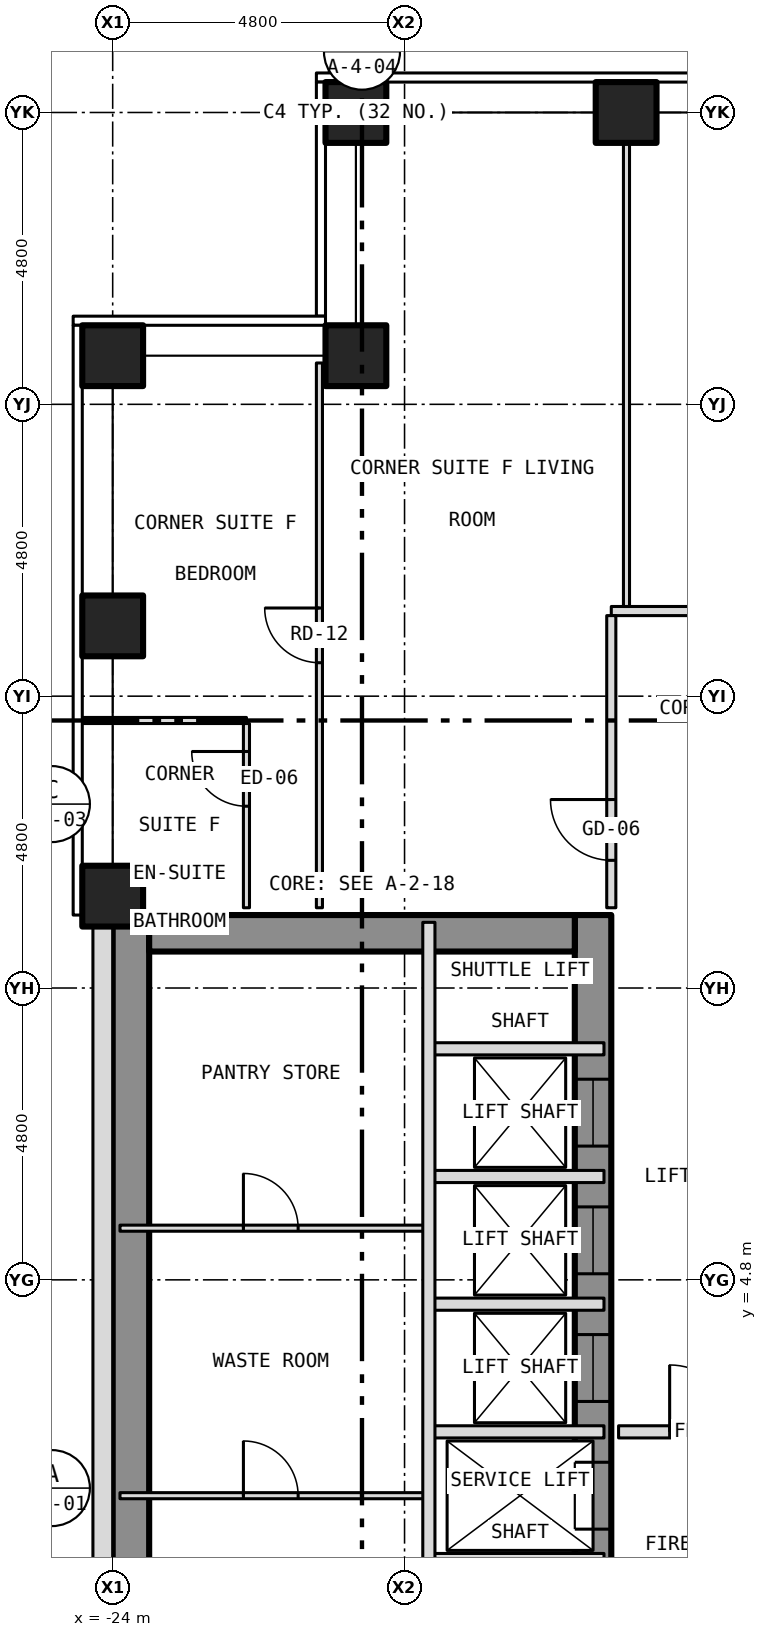
"""IFC4 building model, lengths in metres.
Left out: names, types, materials, properties, quantities, classifications, styles, units other than length and angle.
Written with IfcOpenShell. Run it as: python <this file> out.ifc"""

import sys

from ifc_helpers import new_model, si_unit, direction, frame, frame_2d, origin, origin_2d, place, context, subcontext, project, spatial, rectangle, hollow_rectangle, extrude, element, fill, save


model = new_model("IFC4")
c1 = context("Model", 3, precision=1e-05, world=origin(), true_north=direction((0.0, 1.0)))
c2 = subcontext(c1, "Body", "Model", "MODEL_VIEW")
j1 = project(units=[si_unit("LENGTHUNIT", "METRE"), si_unit("PLANEANGLEUNIT", "RADIAN")], contexts=[c1])
p1 = place(None, origin())
s1 = spatial("IfcSite", under=j1, at=p1, CompositionType="ELEMENT")
p2 = place(p1, origin())
s2 = spatial("IfcBuilding", under=s1, at=p2, CompositionType="ELEMENT")
p3 = place(p2, frame((0.0, 0.0, 67.0)))
s3 = spatial("IfcBuildingStorey", under=s2, at=p3, CompositionType="ELEMENT", Elevation=67.0)
for number, where, z_axis, x_axis in (
    (1, (-20.0, 24.0, -0.15), (0.0, 0.0, 1.0), (1.0, 0.0, 0.0)),
    (2, (-15.556, 24.0, -0.15), (0.0, 0.0, 1.0), (1.0, 0.0, 0.0)),
    (3, (-24.0, 11.111, -0.15), (0.0, 0.0, 1.0), (1.0, 0.0, 0.0)),
    (4, (-24.0, 15.556, -0.15), (0.0, 0.0, 1.0), (1.0, 0.0, 0.0)),
    (5, (-24.0, 20.0, -0.15), (0.0, 0.0, 1.0), (1.0, 0.0, 0.0)),
    (6, (-20.0, 20.0, -0.15), (0.0, 0.0, 1.0), (1.0, 0.0, 0.0)),
):
    element("IfcColumn", number, at=place(p3, frame(where, z_axis=z_axis, x_axis=x_axis)), inside=s3, PredefinedType="COLUMN", context=c2, shape_type="SweptSolid", body=[
        extrude(hollow_rectangle(XDim=1.0, YDim=1.0, WallThickness=0.06, at=origin_2d()), origin(), (0.0, 0.0, 1.0), 3.5),
    ])
p4 = place(p3, frame((-16.1, -10.8, 0.0), z_axis=(0.0, 0.0, 1.0), x_axis=(0.0, 1.0, 0.0)))
e7 = element("IfcWall", 7, at=p4, inside=s3, PredefinedType="SHEAR", context=c2, shape_type="SweptSolid", body=[
    extrude(rectangle(XDim=21.6, YDim=0.6, at=frame_2d((10.8, 0.0))), origin(), (0.0, 0.0, 1.0), 3.25),
])
p5 = place(p4, frame((9.4, 0.0, 0.0)))
e8 = element("IfcOpeningElement", 8, at=p5, cuts=e7, PredefinedType="OPENING", context=c2, shape_type="SweptSolid", body=[
    extrude(rectangle(XDim=1.1, YDim=2.1, at=frame_2d((0.55, 1.05))), frame((0.0, 0.312, 0.0), z_axis=(0.0, -1.0, 0.0), x_axis=(1.0, 0.0, 0.0)), (0.0, 0.0, 1.0), 0.624),
])
p6 = place(p4, frame((11.5, 0.0, 0.0)))
e9 = element("IfcOpeningElement", 9, at=p6, cuts=e7, PredefinedType="OPENING", context=c2, shape_type="SweptSolid", body=[
    extrude(rectangle(XDim=1.1, YDim=2.1, at=frame_2d((0.55, 1.05))), frame((0.0, 0.312, 0.0), z_axis=(0.0, -1.0, 0.0), x_axis=(1.0, 0.0, 0.0)), (0.0, 0.0, 1.0), 0.624),
])
p7 = place(p4, frame((13.6, 0.0, 0.0)))
e10 = element("IfcOpeningElement", 10, at=p7, cuts=e7, PredefinedType="OPENING", context=c2, shape_type="SweptSolid", body=[
    extrude(rectangle(XDim=1.1, YDim=2.1, at=frame_2d((0.55, 1.05))), frame((0.0, 0.312, 0.0), z_axis=(0.0, -1.0, 0.0), x_axis=(1.0, 0.0, 0.0)), (0.0, 0.0, 1.0), 0.624),
])
p8 = place(p4, frame((15.7, 0.0, 0.0)))
e11 = element("IfcOpeningElement", 11, at=p8, cuts=e7, PredefinedType="OPENING", context=c2, shape_type="SweptSolid", body=[
    extrude(rectangle(XDim=1.1, YDim=2.1, at=frame_2d((0.55, 1.05))), frame((0.0, 0.312, 0.0), z_axis=(0.0, -1.0, 0.0), x_axis=(1.0, 0.0, 0.0)), (0.0, 0.0, 1.0), 0.624),
])
p9 = place(p4, frame((17.8, 0.0, 0.0)))
e12 = element("IfcOpeningElement", 12, at=p9, cuts=e7, PredefinedType="OPENING", context=c2, shape_type="SweptSolid", body=[
    extrude(rectangle(XDim=1.1, YDim=2.1, at=frame_2d((0.55, 1.05))), frame((0.0, 0.312, 0.0), z_axis=(0.0, -1.0, 0.0), x_axis=(1.0, 0.0, 0.0)), (0.0, 0.0, 1.0), 0.624),
])
p10 = place(p4, frame((0.758, 0.0, 0.0)))
e13 = element("IfcOpeningElement", 13, at=p10, cuts=e7, PredefinedType="OPENING", context=c2, shape_type="SweptSolid", body=[
    extrude(rectangle(XDim=1.1, YDim=2.1, at=frame_2d((0.55, 1.05))), frame((0.0, 0.312, 0.0), z_axis=(0.0, -1.0, 0.0), x_axis=(1.0, 0.0, 0.0)), (0.0, 0.0, 1.0), 0.624),
])
p11 = place(p4, frame((7.5, 0.0, 0.0)))
e14 = element("IfcOpeningElement", 14, at=p11, cuts=e7, PredefinedType="OPENING", context=c2, shape_type="SweptSolid", body=[
    extrude(rectangle(XDim=1.1, YDim=2.1, at=frame_2d((0.55, 1.05))), frame((0.0, 0.312, 0.0), z_axis=(0.0, -1.0, 0.0), x_axis=(1.0, 0.0, 0.0)), (0.0, 0.0, 1.0), 0.624),
])
p12 = place(p3, frame((-23.7, -10.8, 0.0), z_axis=(0.0, 0.0, 1.0), x_axis=(0.0, 1.0, 0.0)))
e15 = element("IfcWall", 15, at=p12, inside=s3, PredefinedType="SHEAR", context=c2, shape_type="SweptSolid", body=[
    extrude(rectangle(XDim=21.6, YDim=0.6, at=frame_2d((10.8, 0.0))), origin(), (0.0, 0.0, 1.0), 3.25),
])
p13 = place(p3, frame((-23.4, 10.5, 0.0), z_axis=(0.0, 0.0, 1.0), x_axis=(1.0, 0.0, 0.0)))
e16 = element("IfcWall", 16, at=p13, inside=s3, PredefinedType="SHEAR", context=c2, shape_type="SweptSolid", body=[
    extrude(rectangle(XDim=7.0, YDim=0.6, at=frame_2d((3.5, 0.0))), origin(), (0.0, 0.0, 1.0), 3.25),
])
p14 = place(p3, frame((-24.163, 10.8, 0.0), z_axis=(0.0, 0.0, 1.0), x_axis=(0.0, -1.0, 0.0)))
e17 = element("IfcWall", 17, at=p14, inside=s3, PredefinedType="SOLIDWALL", context=c2, shape_type="SweptSolid", body=[
    extrude(rectangle(XDim=21.6, YDim=0.325, at=frame_2d((10.8, 0.0))), origin(), (0.0, 0.0, 1.0), 3.5),
])
p15 = place(p14, frame((18.05, 0.0, 1.0)))
e18 = element("IfcOpeningElement", 18, at=p15, cuts=e17, PredefinedType="OPENING", context=c2, shape_type="SweptSolid", body=[
    extrude(rectangle(XDim=0.6, YDim=1.5, at=frame_2d((0.3, 0.75))), frame((0.0, 0.175, 0.0), z_axis=(0.0, -1.0, 0.0), x_axis=(1.0, 0.0, 0.0)), (0.0, 0.0, 1.0), 0.349),
])
p16 = place(p3, frame((-18.8, 0.2, 0.0), z_axis=(0.0, 0.0, 1.0), x_axis=(1.0, 0.0, 0.0)))
e19 = element("IfcWall", 19, at=p16, inside=s3, PredefinedType="PARTITIONING", context=c2, shape_type="SweptSolid", body=[
    extrude(rectangle(XDim=2.88, YDim=0.2, at=frame_2d((1.44, 0.0))), origin(), (0.0, 0.0, 1.0), 3.25),
])
p17 = place(p3, frame((-23.88, 1.25, 0.0), z_axis=(0.0, 0.0, 1.0), x_axis=(1.0, 0.0, 0.0)))
e20 = element("IfcWall", 20, at=p17, inside=s3, PredefinedType="PARTITIONING", context=c2, shape_type="SweptSolid", body=[
    extrude(rectangle(XDim=5.08, YDim=0.1, at=frame_2d((2.54, 0.0))), origin(), (0.0, 0.0, 1.0), 3.25),
])
p18 = place(p17, frame((2.03, 0.0, 0.0)))
e21 = element("IfcOpeningElement", 21, at=p18, cuts=e20, PredefinedType="OPENING", context=c2, shape_type="SweptSolid", body=[
    extrude(rectangle(XDim=0.9, YDim=2.1, at=frame_2d((0.45, 1.05))), frame((0.0, 0.062, 0.0), z_axis=(0.0, -1.0, 0.0), x_axis=(1.0, 0.0, 0.0)), (0.0, 0.0, 1.0), 0.124),
])
p19 = place(p3, frame((-18.8, 2.3, 0.0), z_axis=(0.0, 0.0, 1.0), x_axis=(1.0, 0.0, 0.0)))
e22 = element("IfcWall", 22, at=p19, inside=s3, PredefinedType="PARTITIONING", context=c2, shape_type="SweptSolid", body=[
    extrude(rectangle(XDim=2.88, YDim=0.2, at=frame_2d((1.44, 0.0))), origin(), (0.0, 0.0, 1.0), 3.25),
])
p20 = place(p3, frame((-15.68, 2.3, 0.0), z_axis=(0.0, 0.0, 1.0), x_axis=(1.0, 0.0, 0.0)))
e23 = element("IfcWall", 23, at=p20, inside=s3, PredefinedType="PARTITIONING", context=c2, shape_type="SweptSolid", body=[
    extrude(rectangle(XDim=3.28, YDim=0.2, at=frame_2d((1.64, 0.0))), origin(), (0.0, 0.0, 1.0), 3.35),
])
p21 = place(p20, frame((0.84, 0.0, 0.0)))
e24 = element("IfcOpeningElement", 24, at=p21, cuts=e23, PredefinedType="OPENING", context=c2, shape_type="SweptSolid", body=[
    extrude(rectangle(XDim=1.1, YDim=2.1, at=frame_2d((0.55, 1.05))), frame((0.0, 0.112, 0.0), z_axis=(0.0, -1.0, 0.0), x_axis=(1.0, 0.0, 0.0)), (0.0, 0.0, 1.0), 0.224),
])
p22 = place(p3, frame((-18.8, 4.4, 0.0), z_axis=(0.0, 0.0, 1.0), x_axis=(1.0, 0.0, 0.0)))
e25 = element("IfcWall", 25, at=p22, inside=s3, PredefinedType="PARTITIONING", context=c2, shape_type="SweptSolid", body=[
    extrude(rectangle(XDim=2.88, YDim=0.2, at=frame_2d((1.44, 0.0))), origin(), (0.0, 0.0, 1.0), 3.25),
])
p23 = place(p3, frame((-23.88, 5.65, 0.0), z_axis=(0.0, 0.0, 1.0), x_axis=(1.0, 0.0, 0.0)))
e26 = element("IfcWall", 26, at=p23, inside=s3, PredefinedType="PARTITIONING", context=c2, shape_type="SweptSolid", body=[
    extrude(rectangle(XDim=5.08, YDim=0.1, at=frame_2d((2.54, 0.0))), origin(), (0.0, 0.0, 1.0), 3.25),
])
p24 = place(p23, frame((2.03, 0.0, 0.0)))
e27 = element("IfcOpeningElement", 27, at=p24, cuts=e26, PredefinedType="OPENING", context=c2, shape_type="SweptSolid", body=[
    extrude(rectangle(XDim=0.9, YDim=2.1, at=frame_2d((0.45, 1.05))), frame((0.0, 0.062, 0.0), z_axis=(0.0, -1.0, 0.0), x_axis=(1.0, 0.0, 0.0)), (0.0, 0.0, 1.0), 0.124),
])
for number, where, z_axis, x_axis in (
    (28, (-18.8, 6.5, 0.0), (0.0, 0.0, 1.0), (1.0, 0.0, 0.0)),
    (29, (-18.8, 8.6, 0.0), (0.0, 0.0, 1.0), (1.0, 0.0, 0.0)),
):
    element("IfcWall", number, at=place(p3, frame(where, z_axis=z_axis, x_axis=x_axis)), inside=s3, PredefinedType="PARTITIONING", context=c2, shape_type="SweptSolid", body=[
        extrude(rectangle(XDim=2.88, YDim=0.2, at=frame_2d((1.44, 0.0))), origin(), (0.0, 0.0, 1.0), 3.25),
    ])
p25 = place(p3, frame((-24.53, 14.0, 0.0), z_axis=(0.0, 0.0, 1.0), x_axis=(1.0, 0.0, 0.0)))
e30 = element("IfcWall", 30, at=p25, inside=s3, PredefinedType="PARTITIONING", context=c2, shape_type="SweptSolid", body=[
    extrude(rectangle(XDim=2.73, YDim=0.1, at=frame_2d((1.365, 0.0))), origin(), (0.0, 0.0, 1.0), 3.35),
])
p26 = place(p3, frame((-15.8, 15.8, 0.0), z_axis=(0.0, 0.0, 1.0), x_axis=(1.0, 0.0, 0.0)))
e31 = element("IfcWall", 31, at=p26, inside=s3, PredefinedType="PARTITIONING", context=c2, shape_type="SweptSolid", body=[
    extrude(rectangle(XDim=6.65, YDim=0.15, at=frame_2d((3.325, 0.0))), origin(), (0.0, 0.0, 1.0), 3.35),
])
p27 = place(p26, frame((1.847, 0.0, 0.0)))
e32 = element("IfcOpeningElement", 32, at=p27, cuts=e31, PredefinedType="OPENING", context=c2, shape_type="SweptSolid", body=[
    extrude(rectangle(XDim=1.0, YDim=2.1, at=frame_2d((0.5, 1.05))), frame((0.0, 0.087, 0.0), z_axis=(0.0, -1.0, 0.0), x_axis=(1.0, 0.0, 0.0)), (0.0, 0.0, 1.0), 0.174),
])
p28 = place(p3, frame((-21.8, 10.92, 0.0), z_axis=(0.0, 0.0, 1.0), x_axis=(0.0, 1.0, 0.0)))
e33 = element("IfcWall", 33, at=p28, inside=s3, PredefinedType="PARTITIONING", context=c2, shape_type="SweptSolid", body=[
    extrude(rectangle(XDim=3.03, YDim=0.1, at=frame_2d((1.515, 0.0))), origin(), (0.0, 0.0, 1.0), 3.35),
])
p29 = place(p28, frame((1.67, 0.0, 0.0)))
e34 = element("IfcOpeningElement", 34, at=p29, cuts=e33, PredefinedType="OPENING", context=c2, shape_type="SweptSolid", body=[
    extrude(rectangle(XDim=0.9, YDim=2.1, at=frame_2d((0.45, 1.05))), frame((0.0, 0.062, 0.0), z_axis=(0.0, -1.0, 0.0), x_axis=(1.0, 0.0, 0.0)), (0.0, 0.0, 1.0), 0.124),
])
p30 = place(p3, frame((-20.6, 10.92, 0.0), z_axis=(0.0, 0.0, 1.0), x_axis=(0.0, 1.0, 0.0)))
e35 = element("IfcWall", 35, at=p30, inside=s3, PredefinedType="PARTITIONING", context=c2, shape_type="SweptSolid", body=[
    extrude(rectangle(XDim=8.96, YDim=0.1, at=frame_2d((4.48, 0.0))), origin(), (0.0, 0.0, 1.0), 3.35),
])
p31 = place(p30, frame((4.03, 0.0, 0.0)))
e36 = element("IfcOpeningElement", 36, at=p31, cuts=e35, PredefinedType="OPENING", context=c2, shape_type="SweptSolid", body=[
    extrude(rectangle(XDim=0.9, YDim=2.1, at=frame_2d((0.45, 1.05))), frame((0.0, 0.062, 0.0), z_axis=(0.0, -1.0, 0.0), x_axis=(1.0, 0.0, 0.0)), (0.0, 0.0, 1.0), 0.124),
])
p32 = place(p3, frame((-18.8, -1.8, 0.0), z_axis=(0.0, 0.0, 1.0), x_axis=(0.0, 1.0, 0.0)))
e37 = element("IfcWall", 37, at=p32, inside=s3, PredefinedType="PARTITIONING", context=c2, shape_type="SweptSolid", body=[
    extrude(rectangle(XDim=12.48, YDim=0.2, at=frame_2d((6.24, 0.0))), origin(), (0.0, 0.0, 1.0), 3.25),
])
p33 = place(p3, frame((-15.8, 10.92, 0.0), z_axis=(0.0, 0.0, 1.0), x_axis=(0.0, 1.0, 0.0)))
e38 = element("IfcWall", 38, at=p33, inside=s3, PredefinedType="PARTITIONING", context=c2, shape_type="SweptSolid", body=[
    extrude(rectangle(XDim=4.805, YDim=0.15, at=frame_2d((2.403, 0.0))), origin(), (0.0, 0.0, 1.0), 3.35),
])
p34 = place(p33, frame((0.78, 0.0, 0.0)))
e39 = element("IfcOpeningElement", 39, at=p34, cuts=e38, PredefinedType="OPENING", context=c2, shape_type="SweptSolid", body=[
    extrude(rectangle(XDim=1.0, YDim=2.1, at=frame_2d((0.5, 1.05))), frame((0.0, 0.087, 0.0), z_axis=(0.0, -1.0, 0.0), x_axis=(1.0, 0.0, 0.0)), (0.0, 0.0, 1.0), 0.174),
])
p35 = place(p3, frame((-15.55, 15.875, 0.0), z_axis=(0.0, 0.0, 1.0), x_axis=(0.0, 1.0, 0.0)))
e40 = element("IfcWall", 40, at=p35, inside=s3, PredefinedType="PARTITIONING", context=c2, shape_type="SweptSolid", body=[
    extrude(rectangle(XDim=8.005, YDim=0.1, at=frame_2d((4.002, 0.0))), origin(), (0.0, 0.0, 1.0), 3.35),
])
p36 = place(p6, origin())
e41 = element("IfcDoor", 41, at=p36, inside=s3, OperationType="SLIDING_TO_LEFT", PredefinedType="DOOR", context=c2, shape_type="SweptSolid", body=[
    extrude(rectangle(XDim=1.1, YDim=2.1, at=frame_2d((0.55, 1.05))), frame((0.0, 0.025, 0.0), z_axis=(0.0, -1.0, 0.0), x_axis=(1.0, 0.0, 0.0)), (0.0, 0.0, 1.0), 0.05),
])
fill(e9, e41)
p37 = place(p7, origin())
e42 = element("IfcDoor", 42, at=p37, inside=s3, OperationType="SLIDING_TO_LEFT", PredefinedType="DOOR", context=c2, shape_type="SweptSolid", body=[
    extrude(rectangle(XDim=1.1, YDim=2.1, at=frame_2d((0.55, 1.05))), frame((0.0, 0.025, 0.0), z_axis=(0.0, -1.0, 0.0), x_axis=(1.0, 0.0, 0.0)), (0.0, 0.0, 1.0), 0.05),
])
fill(e10, e42)
p38 = place(p8, origin())
e43 = element("IfcDoor", 43, at=p38, inside=s3, OperationType="SLIDING_TO_LEFT", PredefinedType="DOOR", context=c2, shape_type="SweptSolid", body=[
    extrude(rectangle(XDim=1.1, YDim=2.1, at=frame_2d((0.55, 1.05))), frame((0.0, 0.025, 0.0), z_axis=(0.0, -1.0, 0.0), x_axis=(1.0, 0.0, 0.0)), (0.0, 0.0, 1.0), 0.05),
])
fill(e11, e43)
p39 = place(p9, origin())
e44 = element("IfcDoor", 44, at=p39, inside=s3, OperationType="SLIDING_TO_LEFT", PredefinedType="DOOR", context=c2, shape_type="SweptSolid", body=[
    extrude(rectangle(XDim=1.1, YDim=2.1, at=frame_2d((0.55, 1.05))), frame((0.0, 0.025, 0.0), z_axis=(0.0, -1.0, 0.0), x_axis=(1.0, 0.0, 0.0)), (0.0, 0.0, 1.0), 0.05),
])
fill(e12, e44)
p40 = place(p18, origin())
e45 = element("IfcDoor", 45, at=p40, inside=s3, OperationType="SINGLE_SWING_LEFT", PredefinedType="DOOR", context=c2, shape_type="SweptSolid", body=[
    extrude(rectangle(XDim=0.9, YDim=2.1, at=frame_2d((0.45, 1.05))), frame((0.0, 0.025, 0.0), z_axis=(0.0, -1.0, 0.0), x_axis=(1.0, 0.0, 0.0)), (0.0, 0.0, 1.0), 0.05),
])
fill(e21, e45)
p41 = place(p24, origin())
e46 = element("IfcDoor", 46, at=p41, inside=s3, OperationType="SINGLE_SWING_LEFT", PredefinedType="DOOR", context=c2, shape_type="SweptSolid", body=[
    extrude(rectangle(XDim=0.9, YDim=2.1, at=frame_2d((0.45, 1.05))), frame((0.0, 0.025, 0.0), z_axis=(0.0, -1.0, 0.0), x_axis=(1.0, 0.0, 0.0)), (0.0, 0.0, 1.0), 0.05),
])
fill(e27, e46)
p42 = place(p21, origin())
e47 = element("IfcDoor", 47, at=p42, inside=s3, OperationType="SINGLE_SWING_LEFT", PredefinedType="DOOR", context=c2, shape_type="SweptSolid", body=[
    extrude(rectangle(XDim=1.1, YDim=2.1, at=frame_2d((0.55, 1.05))), frame((0.0, 0.025, 0.0), z_axis=(0.0, -1.0, 0.0), x_axis=(1.0, 0.0, 0.0)), (0.0, 0.0, 1.0), 0.05),
])
fill(e24, e47)
p43 = place(p34, origin())
e48 = element("IfcDoor", 48, at=p43, inside=s3, OperationType="SINGLE_SWING_RIGHT", PredefinedType="DOOR", context=c2, shape_type="SweptSolid", body=[
    extrude(rectangle(XDim=1.0, YDim=2.1, at=frame_2d((0.5, 1.05))), frame((0.0, 0.025, 0.0), z_axis=(0.0, -1.0, 0.0), x_axis=(1.0, 0.0, 0.0)), (0.0, 0.0, 1.0), 0.05),
])
fill(e39, e48)
p44 = place(p31, origin())
e49 = element("IfcDoor", 49, at=p44, inside=s3, OperationType="SINGLE_SWING_RIGHT", PredefinedType="DOOR", context=c2, shape_type="SweptSolid", body=[
    extrude(rectangle(XDim=0.9, YDim=2.1, at=frame_2d((0.45, 1.05))), frame((0.0, 0.025, 0.0), z_axis=(0.0, -1.0, 0.0), x_axis=(1.0, 0.0, 0.0)), (0.0, 0.0, 1.0), 0.05),
])
fill(e36, e49)
p45 = place(p29, origin())
e50 = element("IfcDoor", 50, at=p45, inside=s3, OperationType="SINGLE_SWING_RIGHT", PredefinedType="DOOR", context=c2, shape_type="SweptSolid", body=[
    extrude(rectangle(XDim=0.9, YDim=2.1, at=frame_2d((0.45, 1.05))), frame((0.0, 0.025, 0.0), z_axis=(0.0, -1.0, 0.0), x_axis=(1.0, 0.0, 0.0)), (0.0, 0.0, 1.0), 0.05),
])
fill(e34, e50)
save(model, sys.argv[1])
